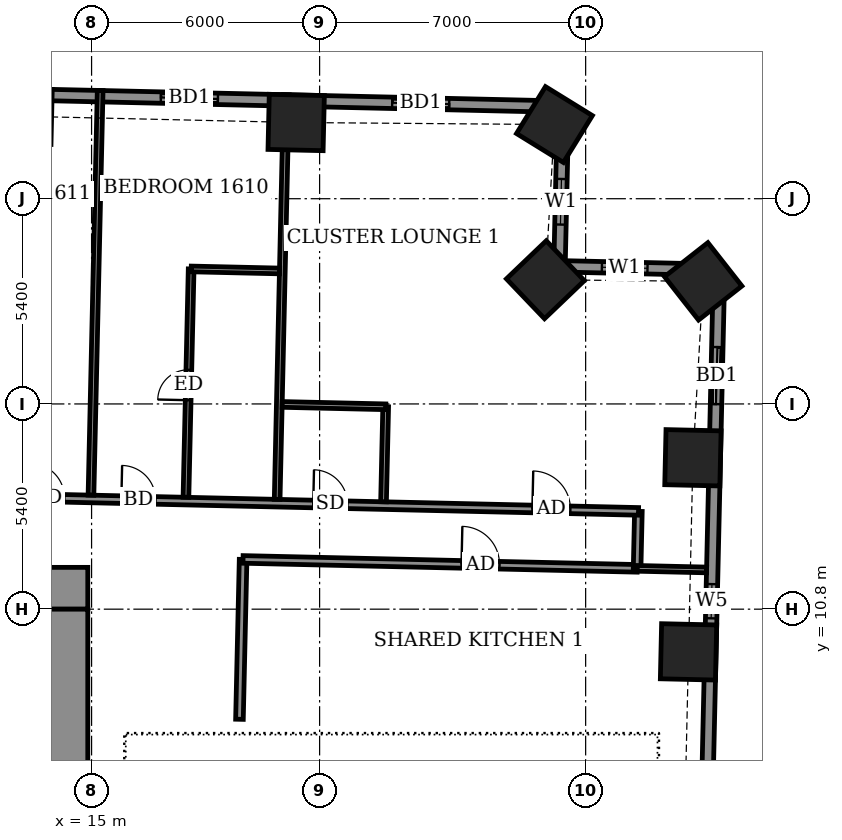
"""IFC4 building model, lengths in metres.
Left out: names, types, materials, properties, quantities, classifications, styles, units other than length and angle.
Written with IfcOpenShell. Run it as: python <this file> out.ifc"""

import sys

from ifc_helpers import new_model, si_unit, direction, frame, frame_2d, origin, origin_2d, place, context, subcontext, project, spatial, rectangle, extrude, element, fill, save


model = new_model("IFC4")
c1 = context("Model", 3, precision=1e-05, world=origin(), true_north=direction((0.0, 1.0)))
c2 = subcontext(c1, "Body", "Model", "MODEL_VIEW")
j1 = project(units=[si_unit("LENGTHUNIT", "METRE"), si_unit("PLANEANGLEUNIT", "RADIAN")], contexts=[c1])
p1 = place(None, origin())
s1 = spatial("IfcSite", under=j1, at=p1, CompositionType="ELEMENT")
p2 = place(p1, origin())
s2 = spatial("IfcBuilding", under=s1, at=p2, CompositionType="ELEMENT")
p3 = place(p2, frame((0.0, 0.0, 67.5)))
s3 = spatial("IfcBuildingStorey", under=s2, at=p3, CompositionType="ELEMENT", Elevation=67.5)
for number, where, z_axis, x_axis in (
    (1, (30.707, 9.677, -0.55), (0.0, 0.0, 1.0), (0.023, 1.0, 0.0)),
    (2, (30.823, 14.783, -0.55), (0.0, 0.0, 1.0), (0.023, 1.0, 0.0)),
    (3, (31.094, 19.425, -0.55), (0.0, 0.0, 1.0), (-0.617, 0.787, 0.0)),
    (4, (26.941, 19.468, -0.55), (0.0, 0.0, 1.0), (-0.691, 0.723, 0.0)),
    (5, (27.179, 23.551, -0.55), (0.0, 0.0, 1.0), (-0.851, 0.525, 0.0)),
    (6, (20.384, 23.605, -0.55), (0.0, 0.0, 1.0), (-1.0, 0.023, 0.0)),
):
    element("IfcColumn", number, at=place(p3, frame(where, z_axis=z_axis, x_axis=x_axis)), inside=s3, PredefinedType="COLUMN", context=c2, shape_type="SweptSolid", body=[
        extrude(rectangle(XDim=1.45, YDim=1.45, at=origin_2d()), origin(), (0.0, 0.0, 1.0), 3.6),
    ])
p4 = place(p3, frame((31.165, 4.502, 0.0), z_axis=(0.0, 0.0, 1.0), x_axis=(0.022716307128, 0.999741951401, 0.0)))
e7 = element("IfcWall", 7, at=p4, inside=s3, PredefinedType="SOLIDWALL", context=c2, shape_type="SweptSolid", body=[
    extrude(rectangle(XDim=15.229, YDim=0.3, at=frame_2d((7.615, 0.0))), origin(), (0.0, 0.0, 1.0), 3.05),
])
p5 = place(p4, frame((6.059, 0.0, 0.9)))
e8 = element("IfcOpeningElement", 8, at=p5, cuts=e7, PredefinedType="OPENING", context=c2, shape_type="SweptSolid", body=[
    extrude(rectangle(XDim=0.9, YDim=1.5, at=frame_2d((0.45, 0.75))), frame((0.0, 0.16, 0.0), z_axis=(0.0, -1.0, 0.0), x_axis=(1.0, 0.0, 0.0)), (0.0, 0.0, 1.0), 0.32),
])
p6 = place(p4, frame((11.697, 0.0, 0.0)))
e9 = element("IfcOpeningElement", 9, at=p6, cuts=e7, PredefinedType="OPENING", context=c2, shape_type="SweptSolid", body=[
    extrude(rectangle(XDim=1.5, YDim=2.4, at=frame_2d((0.75, 1.2))), frame((0.0, 0.16, 0.0), z_axis=(0.0, -1.0, 0.0), x_axis=(1.0, 0.0, 0.0)), (0.0, 0.0, 1.0), 0.32),
])
p7 = place(p3, frame((31.511, 19.727, 0.0), z_axis=(0.0, 0.0, 1.0), x_axis=(-0.999744320311, 0.022611811187, 0.0)))
e10 = element("IfcWall", 10, at=p7, inside=s3, PredefinedType="SOLIDWALL", context=c2, shape_type="SweptSolid", body=[
    extrude(rectangle(XDim=4.2, YDim=0.3, at=frame_2d((2.1, 0.0))), origin(), (0.0, 0.0, 1.0), 2.55),
])
p8 = place(p7, frame((1.884, 0.0, 0.9)))
e11 = element("IfcOpeningElement", 11, at=p8, cuts=e10, PredefinedType="OPENING", context=c2, shape_type="SweptSolid", body=[
    extrude(rectangle(XDim=1.2, YDim=1.5, at=frame_2d((0.6, 0.75))), frame((0.0, 0.16, 0.0), z_axis=(0.0, -1.0, 0.0), x_axis=(1.0, 0.0, 0.0)), (0.0, 0.0, 1.0), 0.32),
])
p9 = place(p3, frame((27.312, 19.822, 0.0), z_axis=(0.0, 0.0, 1.0), x_axis=(0.022611811187, 0.999744320311, 0.0)))
e12 = element("IfcWall", 12, at=p9, inside=s3, PredefinedType="SOLIDWALL", context=c2, shape_type="SweptSolid", body=[
    extrude(rectangle(XDim=4.2, YDim=0.3, at=frame_2d((2.1, 0.0))), origin(), (0.0, 0.0, 1.0), 2.55),
])
p10 = place(p9, frame((1.098, 0.0, 0.9)))
e13 = element("IfcOpeningElement", 13, at=p10, cuts=e12, PredefinedType="OPENING", context=c2, shape_type="SweptSolid", body=[
    extrude(rectangle(XDim=1.2, YDim=1.5, at=frame_2d((0.6, 0.75))), frame((0.0, 0.16, 0.0), z_axis=(0.0, -1.0, 0.0), x_axis=(1.0, 0.0, 0.0)), (0.0, 0.0, 1.0), 0.32),
])
p11 = place(p3, frame((27.407, 24.021, 0.0), z_axis=(0.0, 0.0, 1.0), x_axis=(-0.99974239923, 0.022696589664, 0.0)))
e14 = element("IfcWall", 14, at=p11, inside=s3, PredefinedType="SOLIDWALL", context=c2, shape_type="SweptSolid", body=[
    extrude(rectangle(XDim=49.836, YDim=0.3, at=frame_2d((24.918, 0.0))), origin(), (0.0, 0.0, 1.0), 3.05),
])
p12 = place(p11, frame((2.998, 0.0, 0.0)))
e15 = element("IfcOpeningElement", 15, at=p12, cuts=e14, PredefinedType="OPENING", context=c2, shape_type="SweptSolid", body=[
    extrude(rectangle(XDim=1.5, YDim=2.4, at=frame_2d((0.75, 1.2))), frame((0.0, 0.16, 0.0), z_axis=(0.0, -1.0, 0.0), x_axis=(1.0, 0.0, 0.0)), (0.0, 0.0, 1.0), 0.32),
])
p13 = place(p11, frame((9.086, 0.0, 0.0)))
e16 = element("IfcOpeningElement", 16, at=p13, cuts=e14, PredefinedType="OPENING", context=c2, shape_type="SweptSolid", body=[
    extrude(rectangle(XDim=1.5, YDim=2.4, at=frame_2d((0.75, 1.2))), frame((0.0, 0.16, 0.0), z_axis=(0.0, -1.0, 0.0), x_axis=(1.0, 0.0, 0.0)), (0.0, 0.0, 1.0), 0.32),
])
p14 = place(p11, frame((15.017, 0.0, 0.0)))
e17 = element("IfcOpeningElement", 17, at=p14, cuts=e14, PredefinedType="OPENING", context=c2, shape_type="SweptSolid", body=[
    extrude(rectangle(XDim=1.5, YDim=2.4, at=frame_2d((0.75, 1.2))), frame((0.0, 0.16, 0.0), z_axis=(0.0, -1.0, 0.0), x_axis=(1.0, 0.0, 0.0)), (0.0, 0.0, 1.0), 0.32),
])
p15 = place(p11, frame((18.124, 0.0, 0.0)))
e18 = element("IfcOpeningElement", 18, at=p15, cuts=e14, PredefinedType="OPENING", context=c2, shape_type="SweptSolid", body=[
    extrude(rectangle(XDim=1.5, YDim=2.4, at=frame_2d((0.75, 1.2))), frame((0.0, 0.16, 0.0), z_axis=(0.0, -1.0, 0.0), x_axis=(1.0, 0.0, 0.0)), (0.0, 0.0, 1.0), 0.32),
])
p16 = place(p11, frame((23.149, 0.0, 0.0)))
e19 = element("IfcOpeningElement", 19, at=p16, cuts=e14, PredefinedType="OPENING", context=c2, shape_type="SweptSolid", body=[
    extrude(rectangle(XDim=1.5, YDim=2.4, at=frame_2d((0.75, 1.2))), frame((0.0, 0.16, 0.0), z_axis=(0.0, -1.0, 0.0), x_axis=(1.0, 0.0, 0.0)), (0.0, 0.0, 1.0), 0.32),
])
p17 = place(p11, frame((26.405, 0.0, 0.0)))
e20 = element("IfcOpeningElement", 20, at=p17, cuts=e14, PredefinedType="OPENING", context=c2, shape_type="SweptSolid", body=[
    extrude(rectangle(XDim=1.2, YDim=2.4, at=frame_2d((0.6, 1.2))), frame((0.0, 0.16, 0.0), z_axis=(0.0, -1.0, 0.0), x_axis=(1.0, 0.0, 0.0)), (0.0, 0.0, 1.0), 0.32),
])
p18 = place(p11, frame((31.986, 0.0, 0.0)))
e21 = element("IfcOpeningElement", 21, at=p18, cuts=e14, PredefinedType="OPENING", context=c2, shape_type="SweptSolid", body=[
    extrude(rectangle(XDim=1.5, YDim=2.4, at=frame_2d((0.75, 1.2))), frame((0.0, 0.16, 0.0), z_axis=(0.0, -1.0, 0.0), x_axis=(1.0, 0.0, 0.0)), (0.0, 0.0, 1.0), 0.32),
])
p19 = place(p11, frame((37.211, 0.0, 0.0)))
e22 = element("IfcOpeningElement", 22, at=p19, cuts=e14, PredefinedType="OPENING", context=c2, shape_type="SweptSolid", body=[
    extrude(rectangle(XDim=1.5, YDim=2.4, at=frame_2d((0.75, 1.2))), frame((0.0, 0.16, 0.0), z_axis=(0.0, -1.0, 0.0), x_axis=(1.0, 0.0, 0.0)), (0.0, 0.0, 1.0), 0.32),
])
p20 = place(p11, frame((40.317, 0.0, 0.0)))
e23 = element("IfcOpeningElement", 23, at=p20, cuts=e14, PredefinedType="OPENING", context=c2, shape_type="SweptSolid", body=[
    extrude(rectangle(XDim=1.5, YDim=2.4, at=frame_2d((0.75, 1.2))), frame((0.0, 0.16, 0.0), z_axis=(0.0, -1.0, 0.0), x_axis=(1.0, 0.0, 0.0)), (0.0, 0.0, 1.0), 0.32),
])
p21 = place(p11, frame((45.431, 0.0, 0.9)))
e24 = element("IfcOpeningElement", 24, at=p21, cuts=e14, PredefinedType="OPENING", context=c2, shape_type="SweptSolid", body=[
    extrude(rectangle(XDim=2.4, YDim=1.5, at=frame_2d((1.2, 0.75))), frame((0.0, 0.16, 0.0), z_axis=(0.0, -1.0, 0.0), x_axis=(1.0, 0.0, 0.0)), (0.0, 0.0, 1.0), 0.32),
])
p22 = place(p3, frame((18.891, 7.903, 0.0), z_axis=(0.0, 0.0, 1.0), x_axis=(0.022807092041, 0.999739884446, 0.0)))
e25 = element("IfcWall", 25, at=p22, inside=s3, PredefinedType="PARTITIONING", context=c2, shape_type="SweptSolid", body=[
    extrude(rectangle(XDim=4.207, YDim=0.2, at=frame_2d((2.104, 0.0))), origin(), (0.0, 0.0, 1.0), 3.05),
])
p23 = place(p3, frame((18.985, 12.109, 0.0), z_axis=(0.0, 0.0, 1.0), x_axis=(0.999743715221, -0.022638548456, 0.0)))
e26 = element("IfcWall", 26, at=p23, inside=s3, PredefinedType="PARTITIONING", context=c2, shape_type="SweptSolid", body=[
    extrude(rectangle(XDim=10.375, YDim=0.2, at=frame_2d((5.187, 0.0))), origin(), (0.0, 0.0, 1.0), 3.05),
])
p24 = place(p23, frame((5.75, 0.0, 0.0)))
e27 = element("IfcOpeningElement", 27, at=p24, cuts=e26, PredefinedType="OPENING", context=c2, shape_type="SweptSolid", body=[
    extrude(rectangle(XDim=1.0, YDim=2.1, at=frame_2d((0.5, 1.05))), frame((0.0, 0.11, 0.0), z_axis=(0.0, -1.0, 0.0), x_axis=(1.0, 0.0, 0.0)), (0.0, 0.0, 1.0), 0.22),
])
p25 = place(p3, frame((29.354, 11.874, 0.0), z_axis=(0.0, 0.0, 1.0), x_axis=(0.022632637625, 0.99974384905, 0.0)))
e28 = element("IfcWall", 28, at=p25, inside=s3, PredefinedType="PARTITIONING", context=c2, shape_type="SweptSolid", body=[
    extrude(rectangle(XDim=1.5, YDim=0.2, at=frame_2d((0.75, 0.0))), origin(), (0.0, 0.0, 1.0), 3.05),
])
p26 = place(p3, frame((29.357, 11.874, 0.0), z_axis=(0.0, 0.0, 1.0), x_axis=(0.999735374258, -0.023003944398, 0.0)))
e29 = element("IfcWall", 29, at=p26, inside=s3, PredefinedType="PARTITIONING", context=c2, shape_type="SweptSolid", body=[
    extrude(rectangle(XDim=1.825, YDim=0.15, at=frame_2d((0.913, 0.0))), origin(), (0.0, 0.0, 1.0), 2.55),
])
p27 = place(p3, frame((-25.481, 14.619, 0.0), z_axis=(0.0, 0.0, 1.0), x_axis=(0.999742349682, -0.022698772048, 0.0)))
e30 = element("IfcWall", 30, at=p27, inside=s3, PredefinedType="PARTITIONING", context=c2, shape_type="SweptSolid", body=[
    extrude(rectangle(XDim=54.886, YDim=0.2, at=frame_2d((27.443, 0.0))), origin(), (0.0, 0.0, 1.0), 3.05),
])
p28 = place(p27, frame((52.093, 0.0, 0.0)))
e31 = element("IfcOpeningElement", 31, at=p28, cuts=e30, PredefinedType="OPENING", context=c2, shape_type="SweptSolid", body=[
    extrude(rectangle(XDim=1.0, YDim=2.1, at=frame_2d((0.5, 1.05))), frame((0.0, 0.11, 0.0), z_axis=(0.0, -1.0, 0.0), x_axis=(1.0, 0.0, 0.0)), (0.0, 0.0, 1.0), 0.22),
])
p29 = place(p27, frame((46.325, 0.0, 0.0)))
e32 = element("IfcOpeningElement", 32, at=p29, cuts=e30, PredefinedType="OPENING", context=c2, shape_type="SweptSolid", body=[
    extrude(rectangle(XDim=0.9, YDim=2.1, at=frame_2d((0.45, 1.05))), frame((0.0, 0.11, 0.0), z_axis=(0.0, -1.0, 0.0), x_axis=(1.0, 0.0, 0.0)), (0.0, 0.0, 1.0), 0.22),
])
p30 = place(p27, frame((41.275, 0.0, 0.0)))
e33 = element("IfcOpeningElement", 33, at=p30, cuts=e30, PredefinedType="OPENING", context=c2, shape_type="SweptSolid", body=[
    extrude(rectangle(XDim=0.9, YDim=2.1, at=frame_2d((0.45, 1.05))), frame((0.0, 0.11, 0.0), z_axis=(0.0, -1.0, 0.0), x_axis=(1.0, 0.0, 0.0)), (0.0, 0.0, 1.0), 0.22),
])
p31 = place(p27, frame((38.875, 0.0, 0.0)))
e34 = element("IfcOpeningElement", 34, at=p31, cuts=e30, PredefinedType="OPENING", context=c2, shape_type="SweptSolid", body=[
    extrude(rectangle(XDim=0.9, YDim=2.1, at=frame_2d((0.45, 1.05))), frame((0.0, 0.11, 0.0), z_axis=(0.0, -1.0, 0.0), x_axis=(1.0, 0.0, 0.0)), (0.0, 0.0, 1.0), 0.22),
])
p32 = place(p27, frame((31.95, 0.0, 0.0)))
e35 = element("IfcOpeningElement", 35, at=p32, cuts=e30, PredefinedType="OPENING", context=c2, shape_type="SweptSolid", body=[
    extrude(rectangle(XDim=0.9, YDim=2.1, at=frame_2d((0.45, 1.05))), frame((0.0, 0.11, 0.0), z_axis=(0.0, -1.0, 0.0), x_axis=(1.0, 0.0, 0.0)), (0.0, 0.0, 1.0), 0.22),
])
p33 = place(p27, frame((29.8, 0.0, 0.0)))
e36 = element("IfcOpeningElement", 36, at=p33, cuts=e30, PredefinedType="OPENING", context=c2, shape_type="SweptSolid", body=[
    extrude(rectangle(XDim=0.9, YDim=2.1, at=frame_2d((0.45, 1.05))), frame((0.0, 0.11, 0.0), z_axis=(0.0, -1.0, 0.0), x_axis=(1.0, 0.0, 0.0)), (0.0, 0.0, 1.0), 0.22),
])
p34 = place(p27, frame((22.875, 0.0, 0.0)))
e37 = element("IfcOpeningElement", 37, at=p34, cuts=e30, PredefinedType="OPENING", context=c2, shape_type="SweptSolid", body=[
    extrude(rectangle(XDim=0.9, YDim=2.1, at=frame_2d((0.45, 1.05))), frame((0.0, 0.11, 0.0), z_axis=(0.0, -1.0, 0.0), x_axis=(1.0, 0.0, 0.0)), (0.0, 0.0, 1.0), 0.22),
])
p35 = place(p27, frame((20.675, 0.0, 0.0)))
e38 = element("IfcOpeningElement", 38, at=p35, cuts=e30, PredefinedType="OPENING", context=c2, shape_type="SweptSolid", body=[
    extrude(rectangle(XDim=0.9, YDim=2.1, at=frame_2d((0.45, 1.05))), frame((0.0, 0.11, 0.0), z_axis=(0.0, -1.0, 0.0), x_axis=(1.0, 0.0, 0.0)), (0.0, 0.0, 1.0), 0.22),
])
p36 = place(p27, frame((13.525, 0.0, 0.0)))
e39 = element("IfcOpeningElement", 39, at=p36, cuts=e30, PredefinedType="OPENING", context=c2, shape_type="SweptSolid", body=[
    extrude(rectangle(XDim=0.9, YDim=2.1, at=frame_2d((0.45, 1.05))), frame((0.0, 0.11, 0.0), z_axis=(0.0, -1.0, 0.0), x_axis=(1.0, 0.0, 0.0)), (0.0, 0.0, 1.0), 0.22),
])
p37 = place(p27, frame((11.275, 0.0, 0.0)))
e40 = element("IfcOpeningElement", 40, at=p37, cuts=e30, PredefinedType="OPENING", context=c2, shape_type="SweptSolid", body=[
    extrude(rectangle(XDim=0.9, YDim=2.1, at=frame_2d((0.45, 1.05))), frame((0.0, 0.11, 0.0), z_axis=(0.0, -1.0, 0.0), x_axis=(1.0, 0.0, 0.0)), (0.0, 0.0, 1.0), 0.22),
])
p38 = place(p27, frame((3.079, 0.0, 0.0)))
e41 = element("IfcOpeningElement", 41, at=p38, cuts=e30, PredefinedType="OPENING", context=c2, shape_type="SweptSolid", body=[
    extrude(rectangle(XDim=1.0, YDim=2.1, at=frame_2d((0.5, 1.05))), frame((0.0, 0.11, 0.0), z_axis=(0.0, -1.0, 0.0), x_axis=(1.0, 0.0, 0.0)), (0.0, 0.0, 1.0), 0.22),
])
p39 = place(p3, frame((14.984, 13.8, 0.0), z_axis=(0.0, 0.0, 1.0), x_axis=(0.022739109038, 0.999741433032, 0.0)))
e42 = element("IfcWall", 42, at=p39, inside=s3, PredefinedType="PARTITIONING", context=c2, shape_type="SweptSolid", body=[
    extrude(rectangle(XDim=10.651, YDim=0.15, at=frame_2d((5.325, 0.0))), origin(), (0.0, 0.0, 1.0), 2.55),
])
p40 = place(p3, frame((17.483, 13.744, 0.0), z_axis=(0.0, 0.0, 1.0), x_axis=(0.022831220511, 0.999739333712, 0.0)))
e43 = element("IfcWall", 43, at=p40, inside=s3, PredefinedType="PARTITIONING", context=c2, shape_type="SweptSolid", body=[
    extrude(rectangle(XDim=6.01, YDim=0.15, at=frame_2d((3.005, 0.0))), origin(), (0.0, 0.0, 1.0), 3.05),
])
p41 = place(p40, frame((2.555, 0.0, 0.0)))
e44 = element("IfcOpeningElement", 44, at=p41, cuts=e43, PredefinedType="OPENING", context=c2, shape_type="SweptSolid", body=[
    extrude(rectangle(XDim=0.8, YDim=2.1, at=frame_2d((0.4, 1.05))), frame((0.0, 0.085, 0.0), z_axis=(0.0, -1.0, 0.0), x_axis=(1.0, 0.0, 0.0)), (0.0, 0.0, 1.0), 0.17),
])
p42 = place(p3, frame((19.883, 13.689, 0.0), z_axis=(0.0, 0.0, 1.0), x_axis=(0.022626629517, 0.999743985047, 0.0)))
e45 = element("IfcWall", 45, at=p42, inside=s3, PredefinedType="PARTITIONING", context=c2, shape_type="SweptSolid", body=[
    extrude(rectangle(XDim=10.65, YDim=0.15, at=frame_2d((5.325, 0.0))), origin(), (0.0, 0.0, 1.0), 3.05),
])
p43 = place(p3, frame((22.682, 13.626, 0.0), z_axis=(0.0, 0.0, 1.0), x_axis=(0.022854521249, 0.999738801317, 0.0)))
e46 = element("IfcWall", 46, at=p43, inside=s3, PredefinedType="PARTITIONING", context=c2, shape_type="SweptSolid", body=[
    extrude(rectangle(XDim=2.5, YDim=0.15, at=frame_2d((1.25, 0.0))), origin(), (0.0, 0.0, 1.0), 3.05),
])
p44 = place(p3, frame((20.016, 16.187, 0.0), z_axis=(0.0, 0.0, 1.0), x_axis=(0.99974114142, -0.022751926344, 0.0)))
e47 = element("IfcWall", 47, at=p44, inside=s3, PredefinedType="PARTITIONING", context=c2, shape_type="SweptSolid", body=[
    extrude(rectangle(XDim=2.726, YDim=0.15, at=frame_2d((1.363, 0.0))), origin(), (0.0, 0.0, 1.0), 3.05),
])
p45 = place(p3, frame((17.622, 19.752, 0.0), z_axis=(0.0, 0.0, 1.0), x_axis=(0.999740260747, -0.02279059109, 0.0)))
e48 = element("IfcWall", 48, at=p45, inside=s3, PredefinedType="PARTITIONING", context=c2, shape_type="SweptSolid", body=[
    extrude(rectangle(XDim=2.324, YDim=0.15, at=frame_2d((1.162, 0.0))), origin(), (0.0, 0.0, 1.0), 3.05),
])
p46 = place(p3, frame((-14.9, 11.35, 0.0), z_axis=(0.0, 0.0, 1.0), x_axis=(1.0, 0.0, 0.0)))
e49 = element("IfcWall", 49, at=p46, inside=s3, PredefinedType="SHEAR", context=c2, shape_type="SweptSolid", body=[
    extrude(rectangle(XDim=29.8, YDim=1.1, at=frame_2d((14.9, 0.0))), origin(), (0.0, 0.0, 1.0), 3.6),
])
p47 = place(p3, frame((14.35, -10.8, 0.0), z_axis=(0.0, 0.0, 1.0), x_axis=(0.0, 1.0, 0.0)))
e50 = element("IfcWall", 50, at=p47, inside=s3, PredefinedType="SHEAR", context=c2, shape_type="SweptSolid", body=[
    extrude(rectangle(XDim=21.6, YDim=1.1, at=frame_2d((10.8, 0.0))), origin(), (0.0, 0.0, 1.0), 3.6),
])
p48 = place(p47, frame((1.2, 0.0, 0.0)))
e51 = element("IfcOpeningElement", 51, at=p48, cuts=e50, PredefinedType="OPENING", context=c2, shape_type="SweptSolid", body=[
    extrude(rectangle(XDim=1.2, YDim=2.1, at=frame_2d((0.6, 1.05))), frame((0.0, 0.56, 0.0), z_axis=(0.0, -1.0, 0.0), x_axis=(1.0, 0.0, 0.0)), (0.0, 0.0, 1.0), 1.12),
])
p49 = place(p5, origin())
e52 = element("IfcWindow", 52, at=p49, inside=s3, PartitioningType="SINGLE_PANEL", PredefinedType="WINDOW", context=c2, shape_type="SweptSolid", body=[
    extrude(rectangle(XDim=0.9, YDim=1.5, at=frame_2d((0.45, 0.75))), frame((0.0, 0.03, 0.0), z_axis=(0.0, -1.0, 0.0), x_axis=(1.0, 0.0, 0.0)), (0.0, 0.0, 1.0), 0.06),
])
fill(e8, e52)
p50 = place(p6, origin())
e53 = element("IfcDoor", 53, at=p50, inside=s3, OperationType="SLIDING_TO_LEFT", PredefinedType="DOOR", context=c2, shape_type="SweptSolid", body=[
    extrude(rectangle(XDim=1.5, YDim=2.4, at=frame_2d((0.75, 1.2))), frame((0.0, 0.025, 0.0), z_axis=(0.0, -1.0, 0.0), x_axis=(1.0, 0.0, 0.0)), (0.0, 0.0, 1.0), 0.05),
])
fill(e9, e53)
p51 = place(p8, origin())
e54 = element("IfcWindow", 54, at=p51, inside=s3, PartitioningType="SINGLE_PANEL", PredefinedType="WINDOW", context=c2, shape_type="SweptSolid", body=[
    extrude(rectangle(XDim=1.2, YDim=1.5, at=frame_2d((0.6, 0.75))), frame((0.0, 0.03, 0.0), z_axis=(0.0, -1.0, 0.0), x_axis=(1.0, 0.0, 0.0)), (0.0, 0.0, 1.0), 0.06),
])
fill(e11, e54)
p52 = place(p10, origin())
e55 = element("IfcWindow", 55, at=p52, inside=s3, PartitioningType="SINGLE_PANEL", PredefinedType="WINDOW", context=c2, shape_type="SweptSolid", body=[
    extrude(rectangle(XDim=1.2, YDim=1.5, at=frame_2d((0.6, 0.75))), frame((0.0, 0.03, 0.0), z_axis=(0.0, -1.0, 0.0), x_axis=(1.0, 0.0, 0.0)), (0.0, 0.0, 1.0), 0.06),
])
fill(e13, e55)
p53 = place(p12, origin())
e56 = element("IfcDoor", 56, at=p53, inside=s3, OperationType="SLIDING_TO_LEFT", PredefinedType="DOOR", context=c2, shape_type="SweptSolid", body=[
    extrude(rectangle(XDim=1.5, YDim=2.4, at=frame_2d((0.75, 1.2))), frame((0.0, 0.025, 0.0), z_axis=(0.0, -1.0, 0.0), x_axis=(1.0, 0.0, 0.0)), (0.0, 0.0, 1.0), 0.05),
])
fill(e15, e56)
p54 = place(p13, origin())
e57 = element("IfcDoor", 57, at=p54, inside=s3, OperationType="SLIDING_TO_LEFT", PredefinedType="DOOR", context=c2, shape_type="SweptSolid", body=[
    extrude(rectangle(XDim=1.5, YDim=2.4, at=frame_2d((0.75, 1.2))), frame((0.0, 0.025, 0.0), z_axis=(0.0, -1.0, 0.0), x_axis=(1.0, 0.0, 0.0)), (0.0, 0.0, 1.0), 0.05),
])
fill(e16, e57)
p55 = place(p24, origin())
e58 = element("IfcDoor", 58, at=p55, inside=s3, OperationType="SINGLE_SWING_RIGHT", PredefinedType="DOOR", context=c2, shape_type="SweptSolid", body=[
    extrude(rectangle(XDim=1.0, YDim=2.1, at=frame_2d((0.5, 1.05))), frame((0.0, 0.025, 0.0), z_axis=(0.0, -1.0, 0.0), x_axis=(1.0, 0.0, 0.0)), (0.0, 0.0, 1.0), 0.05),
])
fill(e27, e58)
p56 = place(p28, origin())
e59 = element("IfcDoor", 59, at=p56, inside=s3, OperationType="SINGLE_SWING_LEFT", PredefinedType="DOOR", context=c2, shape_type="SweptSolid", body=[
    extrude(rectangle(XDim=1.0, YDim=2.1, at=frame_2d((0.5, 1.05))), frame((0.0, 0.025, 0.0), z_axis=(0.0, -1.0, 0.0), x_axis=(1.0, 0.0, 0.0)), (0.0, 0.0, 1.0), 0.05),
])
fill(e31, e59)
p57 = place(p29, origin())
e60 = element("IfcDoor", 60, at=p57, inside=s3, OperationType="SINGLE_SWING_RIGHT", PredefinedType="DOOR", context=c2, shape_type="SweptSolid", body=[
    extrude(rectangle(XDim=0.9, YDim=2.1, at=frame_2d((0.45, 1.05))), frame((0.0, 0.025, 0.0), z_axis=(0.0, -1.0, 0.0), x_axis=(1.0, 0.0, 0.0)), (0.0, 0.0, 1.0), 0.05),
])
fill(e32, e60)
p58 = place(p30, origin())
e61 = element("IfcDoor", 61, at=p58, inside=s3, OperationType="SINGLE_SWING_RIGHT", PredefinedType="DOOR", context=c2, shape_type="SweptSolid", body=[
    extrude(rectangle(XDim=0.9, YDim=2.1, at=frame_2d((0.45, 1.05))), frame((0.0, 0.025, 0.0), z_axis=(0.0, -1.0, 0.0), x_axis=(1.0, 0.0, 0.0)), (0.0, 0.0, 1.0), 0.05),
])
fill(e33, e61)
p59 = place(p41, origin())
e62 = element("IfcDoor", 62, at=p59, inside=s3, OperationType="SINGLE_SWING_RIGHT", PredefinedType="DOOR", context=c2, shape_type="SweptSolid", body=[
    extrude(rectangle(XDim=0.8, YDim=2.1, at=frame_2d((0.4, 1.05))), frame((0.0, 0.025, 0.0), z_axis=(0.0, -1.0, 0.0), x_axis=(1.0, 0.0, 0.0)), (0.0, 0.0, 1.0), 0.05),
])
fill(e44, e62)
p60 = place(p31, origin())
e63 = element("IfcDoor", 63, at=p60, inside=s3, OperationType="SINGLE_SWING_LEFT", PredefinedType="DOOR", context=c2, shape_type="SweptSolid", body=[
    extrude(rectangle(XDim=0.9, YDim=2.1, at=frame_2d((0.45, 1.05))), frame((0.0, 0.025, 0.0), z_axis=(0.0, -1.0, 0.0), x_axis=(1.0, 0.0, 0.0)), (0.0, 0.0, 1.0), 0.05),
])
fill(e34, e63)
save(model, sys.argv[1])
